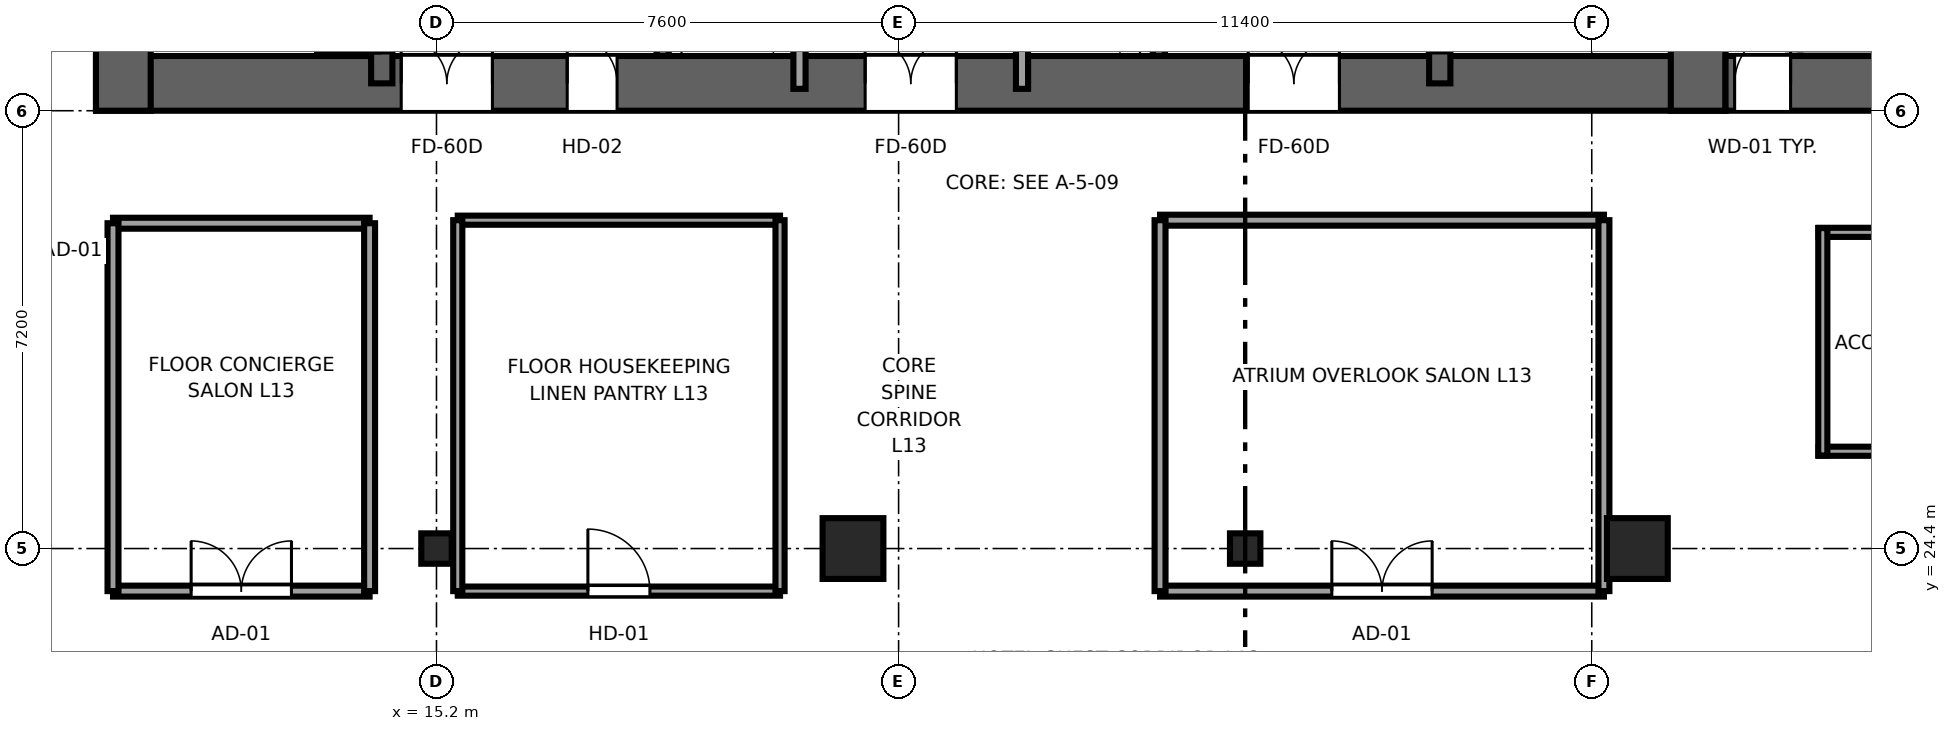
"""IFC4 building model, lengths in metres.
Left out: names, types, materials, properties, quantities, classifications, styles, units other than length and angle.
Written with IfcOpenShell. Run it as: python <this file> out.ifc"""

import sys

from ifc_helpers import new_model, si_unit, direction, frame, frame_2d, origin, origin_2d, place, context, subcontext, project, spatial, rectangle, i_section, extrude, source, transform, mapped, element, fill, save


model = new_model("IFC4")
c1 = context("Model", 3, precision=1e-05, world=origin(), true_north=direction((0.0, 1.0)))
c2 = subcontext(c1, "Body", "Model", "MODEL_VIEW")
j1 = project(units=[si_unit("LENGTHUNIT", "METRE"), si_unit("PLANEANGLEUNIT", "RADIAN")], contexts=[c1])
p1 = place(None, origin())
s1 = spatial("IfcSite", under=j1, at=p1, CompositionType="ELEMENT")
p2 = place(p1, origin())
s2 = spatial("IfcBuilding", under=s1, at=p2, CompositionType="ELEMENT")
p3 = place(p2, frame((0.0, 0.0, 56.85)))
s3 = spatial("IfcBuildingStorey", under=s2, at=p3, CompositionType="ELEMENT", Elevation=56.85)
p4 = place(p3, frame((9.6, 32.05, 0.0), z_axis=(0.0, 0.0, 1.0), x_axis=(1.0, 0.0, 0.0)))
e1 = element("IfcWall", 1, at=p4, inside=s3, PredefinedType="SHEAR", context=c2, shape_type="SweptSolid", body=[
    extrude(rectangle(XDim=26.8, YDim=0.9, at=frame_2d((13.4, 0.0))), origin(), (0.0, 0.0, 1.0), 3.55),
])
p5 = place(p4, frame((6.52, 0.0, 0.0), z_axis=(0.0, 0.0, 1.0), x_axis=(-1.0, 0.0, 0.0)))
e2 = element("IfcOpeningElement", 2, at=p5, cuts=e1, PredefinedType="OPENING", context=c2, shape_type="SweptSolid", body=[
    extrude(rectangle(XDim=1.5, YDim=2.04, at=frame_2d((0.75, 1.02))), frame((0.0, 0.46, 0.0), z_axis=(0.0, -1.0, 0.0), x_axis=(1.0, 0.0, 0.0)), (0.0, 0.0, 1.0), 0.92),
])
p6 = place(p4, frame((14.15, 0.0, 0.0), z_axis=(0.0, 0.0, 1.0), x_axis=(-1.0, 0.0, 0.0)))
e3 = element("IfcOpeningElement", 3, at=p6, cuts=e1, PredefinedType="OPENING", context=c2, shape_type="SweptSolid", body=[
    extrude(rectangle(XDim=1.5, YDim=2.04, at=frame_2d((0.75, 1.02))), frame((0.0, 0.46, 0.0), z_axis=(0.0, -1.0, 0.0), x_axis=(1.0, 0.0, 0.0)), (0.0, 0.0, 1.0), 0.92),
])
p7 = place(p4, frame((20.45, 0.0, 0.0), z_axis=(0.0, 0.0, 1.0), x_axis=(-1.0, 0.0, 0.0)))
e4 = element("IfcOpeningElement", 4, at=p7, cuts=e1, PredefinedType="OPENING", context=c2, shape_type="SweptSolid", body=[
    extrude(rectangle(XDim=1.5, YDim=2.04, at=frame_2d((0.75, 1.02))), frame((0.0, 0.46, 0.0), z_axis=(0.0, -1.0, 0.0), x_axis=(1.0, 0.0, 0.0)), (0.0, 0.0, 1.0), 0.92),
])
p8 = place(p4, frame((8.57, 0.0, 0.0), z_axis=(0.0, 0.0, 1.0), x_axis=(-1.0, 0.0, 0.0)))
e5 = element("IfcOpeningElement", 5, at=p8, cuts=e1, PredefinedType="OPENING", context=c2, shape_type="SweptSolid", body=[
    extrude(rectangle(XDim=0.82, YDim=2.01, at=frame_2d((0.41, 1.005))), frame((0.0, 0.46, 0.0), z_axis=(0.0, -1.0, 0.0), x_axis=(1.0, 0.0, 0.0)), (0.0, 0.0, 1.0), 0.92),
])
for number, where, z_axis, x_axis in (
    (6, (10.05, 31.6, 0.0), (0.0, 0.0, 1.0), (0.0, 1.0, 0.0)),
    (7, (35.95, 31.6, 0.0), (0.0, 0.0, 1.0), (0.0, 1.0, 0.0)),
):
    element("IfcWall", number, at=place(p3, frame(where, z_axis=z_axis, x_axis=x_axis)), inside=s3, PredefinedType="SHEAR", context=c2, shape_type="SweptSolid", body=[
        extrude(rectangle(XDim=13.6, YDim=0.9, at=frame_2d((6.8, 0.0))), origin(), (0.0, 0.0, 1.0), 3.55),
    ])
p9 = place(p3, frame((14.3, 32.05, 0.0), z_axis=(0.0, 0.0, 1.0), x_axis=(0.0, 1.0, 0.0)))
e8 = element("IfcWall", 8, at=p9, inside=s3, PredefinedType="SHEAR", context=c2, shape_type="SweptSolid", body=[
    extrude(rectangle(XDim=12.7, YDim=0.35, at=frame_2d((6.35, 0.0))), origin(), (0.0, 0.0, 1.0), 3.55),
])
p10 = place(p9, frame((0.5, 0.0, 0.0)))
e9 = element("IfcOpeningElement", 9, at=p10, cuts=e8, PredefinedType="OPENING", context=c2, shape_type="SweptSolid", body=[
    extrude(rectangle(XDim=1.1, YDim=2.12, at=frame_2d((0.55, 1.06))), frame((0.0, 0.185, 0.0), z_axis=(0.0, -1.0, 0.0), x_axis=(1.0, 0.0, 0.0)), (0.0, 0.0, 1.0), 0.37),
])
p11 = place(p3, frame((31.7, 32.05, 0.0), z_axis=(0.0, 0.0, 1.0), x_axis=(0.0, 1.0, 0.0)))
e10 = element("IfcWall", 10, at=p11, inside=s3, PredefinedType="SHEAR", context=c2, shape_type="SweptSolid", body=[
    extrude(rectangle(XDim=12.7, YDim=0.35, at=frame_2d((6.35, 0.0))), origin(), (0.0, 0.0, 1.0), 3.55),
])
p12 = place(p11, frame((1.6, 0.0, 0.0), z_axis=(0.0, 0.0, 1.0), x_axis=(-1.0, 0.0, 0.0)))
e11 = element("IfcOpeningElement", 11, at=p12, cuts=e10, PredefinedType="OPENING", context=c2, shape_type="SweptSolid", body=[
    extrude(rectangle(XDim=1.1, YDim=2.12, at=frame_2d((0.55, 1.06))), frame((0.0, 0.185, 0.0), z_axis=(0.0, -1.0, 0.0), x_axis=(1.0, 0.0, 0.0)), (0.0, 0.0, 1.0), 0.37),
])
p13 = place(p3, frame((36.4, 32.05, 0.0), z_axis=(0.0, 0.0, 1.0), x_axis=(1.0, 0.0, 0.0)))
e12 = element("IfcWall", 12, at=p13, inside=s3, PredefinedType="SHEAR", context=c2, shape_type="SweptSolid", body=[
    extrude(rectangle(XDim=4.0, YDim=0.9, at=frame_2d((2.0, 0.0))), origin(), (0.0, 0.0, 1.0), 3.55),
])
p14 = place(p13, frame((1.07, 0.0, 0.0), z_axis=(0.0, 0.0, 1.0), x_axis=(-1.0, 0.0, 0.0)))
e13 = element("IfcOpeningElement", 13, at=p14, cuts=e12, PredefinedType="OPENING", context=c2, shape_type="SweptSolid", body=[
    extrude(rectangle(XDim=0.92, YDim=2.01, at=frame_2d((0.46, 1.005))), frame((0.0, 0.46, 0.0), z_axis=(0.0, -1.0, 0.0), x_axis=(1.0, 0.0, 0.0)), (0.0, 0.0, 1.0), 0.92),
])
m1 = source(origin(), c2, "Body", "SweptSolid", [
    extrude(i_section(OverallWidth=0.5, OverallDepth=0.5, WebThickness=0.028, FlangeThickness=0.045, at=origin_2d()), origin(), (0.0, 0.0, 1.0), 3.55),
])
p15 = place(p3, frame((15.2, 24.4, 0.0), z_axis=(0.0, 0.0, 1.0), x_axis=(1.0, 0.0, 0.0)))
e14 = element("IfcColumn", 14, at=p15, inside=s3, PredefinedType="COLUMN", context=c2, shape_type="MappedRepresentation", body=[
    mapped(m1, transform((0.0, 0.0, 0.0), x_axis=(1.0, 0.0, 0.0), y_axis=(0.0, 1.0, 0.0), z_axis=(0.0, 0.0, 1.0), scale=1.0)),
])
m2 = source(origin(), c2, "Body", "SweptSolid", [
    extrude(rectangle(XDim=1.0, YDim=1.0, at=origin_2d()), origin(), (0.0, 0.0, 1.0), 3.55),
])
for number, where, z_axis, x_axis in (
    (15, (22.05, 24.4, 0.0), (0.0, 0.0, 1.0), (1.0, 0.0, 0.0)),
    (16, (34.95, 24.4, 0.0), (0.0, 0.0, 1.0), (1.0, 0.0, 0.0)),
):
    element("IfcColumn", number, at=place(p3, frame(where, z_axis=z_axis, x_axis=x_axis)), inside=s3, PredefinedType="COLUMN", context=c2, shape_type="MappedRepresentation", body=[
        mapped(m2, transform((0.0, 0.0, 0.0), x_axis=(1.0, 0.0, 0.0), y_axis=(0.0, 1.0, 0.0), z_axis=(0.0, 0.0, 1.0), scale=1.0)),
    ])
p16 = place(p3, frame((28.5, 24.4, 0.0), z_axis=(0.0, 0.0, 1.0), x_axis=(1.0, 0.0, 0.0)))
e17 = element("IfcColumn", 17, at=p16, inside=s3, PredefinedType="COLUMN", context=c2, shape_type="MappedRepresentation", body=[
    mapped(m1, transform((0.0, 0.0, 0.0), x_axis=(1.0, 0.0, 0.0), y_axis=(0.0, 1.0, 0.0), z_axis=(0.0, 0.0, 1.0), scale=1.0)),
])
for number, where, z_axis, x_axis in (
    (18, (18.92, 32.504, 0.0), (0.0, 0.0, 1.0), (0.0, 1.0, 0.0)),
    (19, (27.08, 32.504, 0.0), (0.0, 0.0, 1.0), (0.0, 1.0, 0.0)),
):
    element("IfcWall", number, at=place(p3, frame(where, z_axis=z_axis, x_axis=x_axis)), inside=s3, PredefinedType="SOLIDWALL", context=c2, shape_type="SweptSolid", body=[
        extrude(rectangle(XDim=3.646, YDim=0.2, at=frame_2d((1.823, 0.0))), origin(), (0.0, 0.0, 1.0), 3.37),
    ])
for number, where, z_axis, x_axis in (
    (20, (21.17, 31.96, 0.0), (0.0, 0.0, 1.0), (0.0, 1.0, 0.0)),
    (21, (24.83, 31.96, 0.0), (0.0, 0.0, 1.0), (0.0, 1.0, 0.0)),
):
    element("IfcWall", number, at=place(p3, frame(where, z_axis=z_axis, x_axis=x_axis)), inside=s3, PredefinedType="SOLIDWALL", context=c2, shape_type="SweptSolid", body=[
        extrude(rectangle(XDim=12.58, YDim=0.2, at=frame_2d((6.29, 0.0))), origin(), (0.0, 0.0, 1.0), 3.37),
    ])
for number, where, z_axis, x_axis in (
    (22, (37.93, 26.0, 0.0), (0.0, 0.0, 1.0), (1.0, 0.0, 0.0)),
    (23, (37.93, 29.6, 0.0), (0.0, 0.0, 1.0), (1.0, 0.0, 0.0)),
):
    element("IfcWall", number, at=place(p3, frame(where, z_axis=z_axis, x_axis=x_axis)), inside=s3, PredefinedType="PARTITIONING", context=c2, shape_type="SweptSolid", body=[
        extrude(rectangle(XDim=4.4, YDim=0.15, at=frame_2d((2.2, 0.0))), origin(), (0.0, 0.0, 1.0), 3.37),
    ])
p17 = place(p3, frame((38.0, 25.93, 0.0), z_axis=(0.0, 0.0, 1.0), x_axis=(0.0, 1.0, 0.0)))
e24 = element("IfcWall", 24, at=p17, inside=s3, PredefinedType="PARTITIONING", context=c2, shape_type="SweptSolid", body=[
    extrude(rectangle(XDim=3.74, YDim=0.15, at=frame_2d((1.87, 0.0))), origin(), (0.0, 0.0, 1.0), 3.37),
])
p18 = place(p3, frame((9.88, 23.7, 0.0), z_axis=(0.0, 0.0, 1.0), x_axis=(1.0, 0.0, 0.0)))
e25 = element("IfcWall", 25, at=p18, inside=s3, PredefinedType="PARTITIONING", context=c2, shape_type="SweptSolid", body=[
    extrude(rectangle(XDim=4.22, YDim=0.18, at=frame_2d((2.11, 0.0))), origin(), (0.0, 0.0, 1.0), 3.37),
])
p19 = place(p18, frame((1.285, 0.0, 0.0)))
e26 = element("IfcOpeningElement", 26, at=p19, cuts=e25, PredefinedType="OPENING", context=c2, shape_type="SweptSolid", body=[
    extrude(rectangle(XDim=1.65, YDim=2.15, at=frame_2d((0.825, 1.075))), frame((0.0, 0.1, 0.0), z_axis=(0.0, -1.0, 0.0), x_axis=(1.0, 0.0, 0.0)), (0.0, 0.0, 1.0), 0.2),
])
p20 = place(p3, frame((9.88, 29.75, 0.0), z_axis=(0.0, 0.0, 1.0), x_axis=(1.0, 0.0, 0.0)))
e27 = element("IfcWall", 27, at=p20, inside=s3, PredefinedType="PARTITIONING", context=c2, shape_type="SweptSolid", body=[
    extrude(rectangle(XDim=4.22, YDim=0.18, at=frame_2d((2.11, 0.0))), origin(), (0.0, 0.0, 1.0), 3.37),
])
for number, where, z_axis, x_axis in (
    (28, (9.88, 23.7, 0.0), (0.0, 0.0, 1.0), (0.0, 1.0, 0.0)),
    (29, (14.1, 23.7, 0.0), (0.0, 0.0, 1.0), (0.0, 1.0, 0.0)),
):
    element("IfcWall", number, at=place(p3, frame(where, z_axis=z_axis, x_axis=x_axis)), inside=s3, PredefinedType="PARTITIONING", context=c2, shape_type="SweptSolid", body=[
        extrude(rectangle(XDim=6.05, YDim=0.18, at=frame_2d((3.025, 0.0))), origin(), (0.0, 0.0, 1.0), 3.37),
    ])
p21 = place(p3, frame((27.1, 23.7, 0.0), z_axis=(0.0, 0.0, 1.0), x_axis=(1.0, 0.0, 0.0)))
e30 = element("IfcWall", 30, at=p21, inside=s3, PredefinedType="PARTITIONING", context=c2, shape_type="SweptSolid", body=[
    extrude(rectangle(XDim=7.3, YDim=0.18, at=frame_2d((3.65, 0.0))), origin(), (0.0, 0.0, 1.0), 3.37),
])
p22 = place(p21, frame((2.825, 0.0, 0.0)))
e31 = element("IfcOpeningElement", 31, at=p22, cuts=e30, PredefinedType="OPENING", context=c2, shape_type="SweptSolid", body=[
    extrude(rectangle(XDim=1.65, YDim=2.15, at=frame_2d((0.825, 1.075))), frame((0.0, 0.1, 0.0), z_axis=(0.0, -1.0, 0.0), x_axis=(1.0, 0.0, 0.0)), (0.0, 0.0, 1.0), 0.2),
])
p23 = place(p3, frame((27.1, 29.8, 0.0), z_axis=(0.0, 0.0, 1.0), x_axis=(1.0, 0.0, 0.0)))
e32 = element("IfcWall", 32, at=p23, inside=s3, PredefinedType="PARTITIONING", context=c2, shape_type="SweptSolid", body=[
    extrude(rectangle(XDim=7.3, YDim=0.18, at=frame_2d((3.65, 0.0))), origin(), (0.0, 0.0, 1.0), 3.37),
])
for number, where, z_axis, x_axis in (
    (33, (27.1, 23.7, 0.0), (0.0, 0.0, 1.0), (0.0, 1.0, 0.0)),
    (34, (34.4, 23.7, 0.0), (0.0, 0.0, 1.0), (0.0, 1.0, 0.0)),
):
    element("IfcWall", number, at=place(p3, frame(where, z_axis=z_axis, x_axis=x_axis)), inside=s3, PredefinedType="PARTITIONING", context=c2, shape_type="SweptSolid", body=[
        extrude(rectangle(XDim=6.1, YDim=0.18, at=frame_2d((3.05, 0.0))), origin(), (0.0, 0.0, 1.0), 3.37),
    ])
p24 = place(p3, frame((15.55, 23.7, 0.0), z_axis=(0.0, 0.0, 1.0), x_axis=(1.0, 0.0, 0.0)))
e35 = element("IfcWall", 35, at=p24, inside=s3, PredefinedType="PARTITIONING", context=c2, shape_type="SweptSolid", body=[
    extrude(rectangle(XDim=5.3, YDim=0.15, at=frame_2d((2.65, 0.0))), origin(), (0.0, 0.0, 1.0), 3.37),
])
p25 = place(p24, frame((2.14, 0.0, 0.0)))
e36 = element("IfcOpeningElement", 36, at=p25, cuts=e35, PredefinedType="OPENING", context=c2, shape_type="SweptSolid", body=[
    extrude(rectangle(XDim=1.02, YDim=2.03, at=frame_2d((0.51, 1.015))), frame((0.0, 0.085, 0.0), z_axis=(0.0, -1.0, 0.0), x_axis=(1.0, 0.0, 0.0)), (0.0, 0.0, 1.0), 0.17),
])
p26 = place(p3, frame((15.55, 29.8, 0.0), z_axis=(0.0, 0.0, 1.0), x_axis=(1.0, 0.0, 0.0)))
e37 = element("IfcWall", 37, at=p26, inside=s3, PredefinedType="PARTITIONING", context=c2, shape_type="SweptSolid", body=[
    extrude(rectangle(XDim=5.3, YDim=0.15, at=frame_2d((2.65, 0.0))), origin(), (0.0, 0.0, 1.0), 3.37),
])
for number, where, z_axis, x_axis in (
    (38, (15.55, 23.7, 0.0), (0.0, 0.0, 1.0), (0.0, 1.0, 0.0)),
    (39, (20.85, 23.7, 0.0), (0.0, 0.0, 1.0), (0.0, 1.0, 0.0)),
):
    element("IfcWall", number, at=place(p3, frame(where, z_axis=z_axis, x_axis=x_axis)), inside=s3, PredefinedType="PARTITIONING", context=c2, shape_type="SweptSolid", body=[
        extrude(rectangle(XDim=6.1, YDim=0.15, at=frame_2d((3.05, 0.0))), origin(), (0.0, 0.0, 1.0), 3.37),
    ])
m3 = source(origin(), c2, "Body", "SweptSolid", [
    extrude(rectangle(XDim=1.1, YDim=2.12, at=frame_2d((0.55, 1.06))), frame((0.0, 0.025, 0.0), z_axis=(0.0, -1.0, 0.0), x_axis=(1.0, 0.0, 0.0)), (0.0, 0.0, 1.0), 0.05),
])
p27 = place(p10, origin())
e40 = element("IfcDoor", 40, at=p27, inside=s3, OperationType="SINGLE_SWING_LEFT", PredefinedType="DOOR", context=c2, shape_type="MappedRepresentation", body=[
    mapped(m3, transform((0.0, 0.0, 0.0), x_axis=(1.0, 0.0, 0.0), y_axis=(0.0, 1.0, 0.0), z_axis=(0.0, 0.0, 1.0), scale=1.0)),
])
fill(e9, e40)
p28 = place(p12, origin())
e41 = element("IfcDoor", 41, at=p28, inside=s3, OperationType="SINGLE_SWING_RIGHT", PredefinedType="DOOR", context=c2, shape_type="MappedRepresentation", body=[
    mapped(m3, transform((0.0, 0.0, 0.0), x_axis=(1.0, 0.0, 0.0), y_axis=(0.0, 1.0, 0.0), z_axis=(0.0, 0.0, 1.0), scale=1.0)),
])
fill(e11, e41)
m4 = source(origin(), c2, "Body", "SweptSolid", [
    extrude(rectangle(XDim=1.5, YDim=2.04, at=frame_2d((0.75, 1.02))), frame((0.0, 0.025, 0.0), z_axis=(0.0, -1.0, 0.0), x_axis=(1.0, 0.0, 0.0)), (0.0, 0.0, 1.0), 0.05),
])
p29 = place(p5, origin())
e42 = element("IfcDoor", 42, at=p29, inside=s3, OperationType="DOUBLE_DOOR_SINGLE_SWING", PredefinedType="DOOR", context=c2, shape_type="MappedRepresentation", body=[
    mapped(m4, transform((0.0, 0.0, 0.0), x_axis=(1.0, 0.0, 0.0), y_axis=(0.0, 1.0, 0.0), z_axis=(0.0, 0.0, 1.0), scale=1.0)),
])
fill(e2, e42)
p30 = place(p6, origin())
e43 = element("IfcDoor", 43, at=p30, inside=s3, OperationType="DOUBLE_DOOR_SINGLE_SWING", PredefinedType="DOOR", context=c2, shape_type="MappedRepresentation", body=[
    mapped(m4, transform((0.0, 0.0, 0.0), x_axis=(1.0, 0.0, 0.0), y_axis=(0.0, 1.0, 0.0), z_axis=(0.0, 0.0, 1.0), scale=1.0)),
])
fill(e3, e43)
p31 = place(p7, origin())
e44 = element("IfcDoor", 44, at=p31, inside=s3, OperationType="DOUBLE_DOOR_SINGLE_SWING", PredefinedType="DOOR", context=c2, shape_type="MappedRepresentation", body=[
    mapped(m4, transform((0.0, 0.0, 0.0), x_axis=(1.0, 0.0, 0.0), y_axis=(0.0, 1.0, 0.0), z_axis=(0.0, 0.0, 1.0), scale=1.0)),
])
fill(e4, e44)
m5 = source(origin(), c2, "Body", "SweptSolid", [
    extrude(rectangle(XDim=0.82, YDim=2.01, at=frame_2d((0.41, 1.005))), frame((0.0, 0.025, 0.0), z_axis=(0.0, -1.0, 0.0), x_axis=(1.0, 0.0, 0.0)), (0.0, 0.0, 1.0), 0.05),
])
p32 = place(p8, origin())
e45 = element("IfcDoor", 45, at=p32, inside=s3, OperationType="SINGLE_SWING_LEFT", PredefinedType="DOOR", context=c2, shape_type="MappedRepresentation", body=[
    mapped(m5, transform((0.0, 0.0, 0.0), x_axis=(1.0, 0.0, 0.0), y_axis=(0.0, 1.0, 0.0), z_axis=(0.0, 0.0, 1.0), scale=1.0)),
])
fill(e5, e45)
m6 = source(origin(), c2, "Body", "SweptSolid", [
    extrude(rectangle(XDim=0.92, YDim=2.01, at=frame_2d((0.46, 1.005))), frame((0.0, 0.025, 0.0), z_axis=(0.0, -1.0, 0.0), x_axis=(1.0, 0.0, 0.0)), (0.0, 0.0, 1.0), 0.05),
])
p33 = place(p14, origin())
e46 = element("IfcDoor", 46, at=p33, inside=s3, OperationType="SINGLE_SWING_RIGHT", PredefinedType="DOOR", context=c2, shape_type="MappedRepresentation", body=[
    mapped(m6, transform((0.0, 0.0, 0.0), x_axis=(1.0, 0.0, 0.0), y_axis=(0.0, 1.0, 0.0), z_axis=(0.0, 0.0, 1.0), scale=1.0)),
])
fill(e13, e46)
m7 = source(origin(), c2, "Body", "SweptSolid", [
    extrude(rectangle(XDim=1.65, YDim=2.15, at=frame_2d((0.825, 1.075))), frame((0.0, 0.025, 0.0), z_axis=(0.0, -1.0, 0.0), x_axis=(1.0, 0.0, 0.0)), (0.0, 0.0, 1.0), 0.05),
])
p34 = place(p19, origin())
e47 = element("IfcDoor", 47, at=p34, inside=s3, OperationType="DOUBLE_DOOR_SINGLE_SWING", PredefinedType="DOOR", context=c2, shape_type="MappedRepresentation", body=[
    mapped(m7, transform((0.0, 0.0, 0.0), x_axis=(1.0, 0.0, 0.0), y_axis=(0.0, 1.0, 0.0), z_axis=(0.0, 0.0, 1.0), scale=1.0)),
])
fill(e26, e47)
p35 = place(p22, origin())
e48 = element("IfcDoor", 48, at=p35, inside=s3, OperationType="DOUBLE_DOOR_SINGLE_SWING", PredefinedType="DOOR", context=c2, shape_type="MappedRepresentation", body=[
    mapped(m7, transform((0.0, 0.0, 0.0), x_axis=(1.0, 0.0, 0.0), y_axis=(0.0, 1.0, 0.0), z_axis=(0.0, 0.0, 1.0), scale=1.0)),
])
fill(e31, e48)
m8 = source(origin(), c2, "Body", "SweptSolid", [
    extrude(rectangle(XDim=1.02, YDim=2.03, at=frame_2d((0.51, 1.015))), frame((0.0, 0.025, 0.0), z_axis=(0.0, -1.0, 0.0), x_axis=(1.0, 0.0, 0.0)), (0.0, 0.0, 1.0), 0.05),
])
p36 = place(p25, origin())
e49 = element("IfcDoor", 49, at=p36, inside=s3, OperationType="SINGLE_SWING_LEFT", PredefinedType="DOOR", context=c2, shape_type="MappedRepresentation", body=[
    mapped(m8, transform((0.0, 0.0, 0.0), x_axis=(1.0, 0.0, 0.0), y_axis=(0.0, 1.0, 0.0), z_axis=(0.0, 0.0, 1.0), scale=1.0)),
])
fill(e36, e49)
save(model, sys.argv[1])
